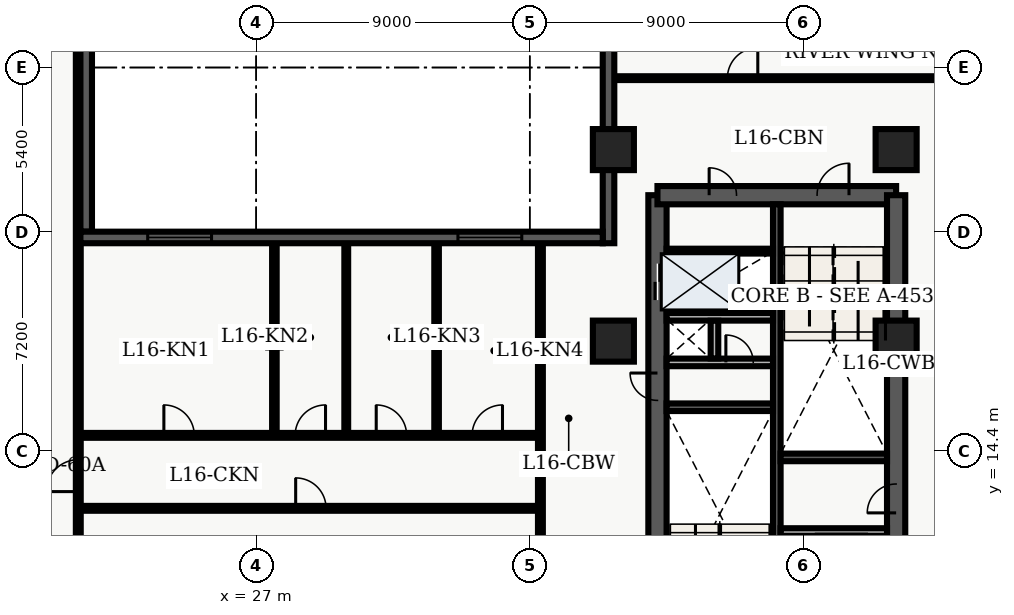
"""IFC4 building model, lengths in metres.
Left out: names, types, materials, properties, quantities, classifications, styles, units other than length and angle.
Written with IfcOpenShell. Run it as: python <this file> out.ifc"""

import sys

from ifc_helpers import new_model, entity, si_unit, converted_unit, direction, frame, origin_with_axes, origin_2d_with_axis, place, context, subcontext, project, spatial, polyline, rectangle, i_section, outline, extrude, element, fill, save


model = new_model("IFC4")
c1 = context("Model", 3, precision=1e-05, world=origin_with_axes(), true_north=direction((0.0, 1.0)))
c2 = subcontext(c1, "Body", "Model", "MODEL_VIEW")
j1 = project(units=[si_unit("LENGTHUNIT", "METRE"), converted_unit("PLANEANGLEUNIT", "DEGREE", entity("IfcPlaneAngleMeasure", 0.017), si_unit("PLANEANGLEUNIT", "RADIAN"), dimensions=[0, 0, 0, 0, 0, 0, 0])], contexts=[c1])
p1 = place(None, origin_with_axes())
s1 = spatial("IfcSite", under=j1, at=p1, CompositionType="ELEMENT")
p2 = place(p1, origin_with_axes())
s2 = spatial("IfcBuilding", under=s1, at=p2, CompositionType="ELEMENT")
p3 = place(p2, frame((0.0, 0.0, 67.8), z_axis=(0.0, 0.0, 1.0), x_axis=(1.0, 0.0, 0.0)))
s3 = spatial("IfcBuildingStorey", under=s2, at=p3, CompositionType="ELEMENT", Elevation=67.8)
p4 = place(p3, frame((40.2, 7.2, 0.0), z_axis=(0.0, 0.0, 1.0), x_axis=(0.0, 1.0, 0.0)))
e1 = element("IfcWall", 1, at=p4, inside=s3, PredefinedType="SHEAR", context=c2, shape_type="SweptSolid", body=[
    extrude(outline(polyline([(0.0, -0.3), (15.6, -0.3), (15.6, 0.3), (0.0, 0.3), (0.0, -0.3)])), origin_with_axes(), (0.0, 0.0, 1.0), 3.66),
])
p5 = place(p4, frame((12.75, 0.0, 0.0), z_axis=(0.0, 0.0, 1.0), x_axis=(1.0, 0.0, 0.0)))
e2 = element("IfcOpeningElement", 2, at=p5, cuts=e1, PredefinedType="OPENING", context=c2, shape_type="SweptSolid", body=[
    extrude(rectangle(XDim=1.2, YDim=0.62, at=origin_2d_with_axis()), origin_with_axes(), (0.0, 0.0, 1.0), 2.15),
])
p6 = place(p4, frame((9.3, 0.0, 0.0), z_axis=(0.0, 0.0, 1.0), x_axis=(1.0, 0.0, 0.0)))
e3 = element("IfcOpeningElement", 3, at=p6, cuts=e1, PredefinedType="OPENING", context=c2, shape_type="SweptSolid", body=[
    extrude(rectangle(XDim=0.9, YDim=0.62, at=origin_2d_with_axis()), origin_with_axes(), (0.0, 0.0, 1.0), 2.15),
])
p7 = place(p3, frame((40.2, 22.8, 0.0), z_axis=(0.0, 0.0, 1.0), x_axis=(1.0, 0.0, 0.0)))
e4 = element("IfcWall", 4, at=p7, inside=s3, PredefinedType="SHEAR", context=c2, shape_type="SweptSolid", body=[
    extrude(outline(polyline([(0.0, -0.3), (7.85, -0.3), (7.85, 0.3), (0.0, 0.3), (0.0, -0.3)])), origin_with_axes(), (0.0, 0.0, 1.0), 3.66),
])
p8 = place(p7, frame((5.775, 0.0, 0.0), z_axis=(0.0, 0.0, 1.0), x_axis=(1.0, 0.0, 0.0)))
e5 = element("IfcOpeningElement", 5, at=p8, cuts=e4, PredefinedType="OPENING", context=c2, shape_type="SweptSolid", body=[
    extrude(rectangle(XDim=1.05, YDim=0.62, at=origin_2d_with_axis()), origin_with_axes(), (0.0, 0.0, 1.0), 2.15),
])
p9 = place(p7, frame((2.15, 0.0, 0.0), z_axis=(0.0, 0.0, 1.0), x_axis=(1.0, 0.0, 0.0)))
e6 = element("IfcOpeningElement", 6, at=p9, cuts=e4, PredefinedType="OPENING", context=c2, shape_type="SweptSolid", body=[
    extrude(rectangle(XDim=0.9, YDim=0.62, at=origin_2d_with_axis()), origin_with_axes(), (0.0, 0.0, 1.0), 2.15),
])
p10 = place(p3, frame((48.05, 7.2, 0.0), z_axis=(0.0, 0.0, 1.0), x_axis=(0.0, 1.0, 0.0)))
e7 = element("IfcWall", 7, at=p10, inside=s3, PredefinedType="SHEAR", context=c2, shape_type="SweptSolid", body=[
    extrude(outline(polyline([(0.0, -0.3), (15.6, -0.3), (15.6, 0.3), (0.0, 0.3), (0.0, -0.3)])), origin_with_axes(), (0.0, 0.0, 1.0), 3.66),
])
p11 = place(p10, frame((1.425, 0.0, 0.0), z_axis=(0.0, 0.0, 1.0), x_axis=(1.0, 0.0, 0.0)))
e8 = element("IfcOpeningElement", 8, at=p11, cuts=e7, PredefinedType="OPENING", context=c2, shape_type="SweptSolid", body=[
    extrude(rectangle(XDim=1.05, YDim=0.62, at=origin_2d_with_axis()), origin_with_axes(), (0.0, 0.0, 1.0), 2.15),
])
p12 = place(p10, frame((3.475, 0.0, 0.0), z_axis=(0.0, 0.0, 1.0), x_axis=(1.0, 0.0, 0.0)))
e9 = element("IfcOpeningElement", 9, at=p12, cuts=e7, PredefinedType="OPENING", context=c2, shape_type="SweptSolid", body=[
    extrude(rectangle(XDim=1.05, YDim=0.62, at=origin_2d_with_axis()), origin_with_axes(), (0.0, 0.0, 1.0), 2.15),
])
p13 = place(p10, frame((5.625, 0.0, 0.0), z_axis=(0.0, 0.0, 1.0), x_axis=(1.0, 0.0, 0.0)))
e10 = element("IfcOpeningElement", 10, at=p13, cuts=e7, PredefinedType="OPENING", context=c2, shape_type="SweptSolid", body=[
    extrude(rectangle(XDim=0.95, YDim=0.62, at=origin_2d_with_axis()), origin_with_axes(), (0.0, 0.0, 1.0), 2.15),
])
p14 = place(p3, frame((44.125, 7.5, 0.0), z_axis=(0.0, 0.0, 1.0), x_axis=(0.0, 1.0, 0.0)))
e11 = element("IfcWall", 11, at=p14, inside=s3, PredefinedType="SHEAR", context=c2, shape_type="SweptSolid", body=[
    extrude(outline(polyline([(0.0, -0.125), (15.0, -0.125), (15.0, 0.125), (0.0, 0.125), (0.0, -0.125)])), origin_with_axes(), (0.0, 0.0, 1.0), 3.66),
])
for number, where, z_axis, x_axis in (
    (12, (40.5, 15.825, 0.0), (0.0, 0.0, 1.0), (1.0, 0.0, 0.0)),
    (13, (44.25, 14.175, 0.0), (0.0, 0.0, 1.0), (1.0, 0.0, 0.0)),
):
    element("IfcWall", number, at=place(p3, frame(where, z_axis=z_axis, x_axis=x_axis)), inside=s3, PredefinedType="SHEAR", context=c2, shape_type="SweptSolid", body=[
        extrude(outline(polyline([(0.0, -0.125), (3.5, -0.125), (3.5, 0.125), (0.0, 0.125), (0.0, -0.125)])), origin_with_axes(), (0.0, 0.0, 1.0), 3.66),
    ])
p15 = place(p3, frame((40.5, 17.3, 0.0), z_axis=(0.0, 0.0, 1.0), x_axis=(1.0, 0.0, 0.0)))
e14 = element("IfcWall", 14, at=p15, inside=s3, PredefinedType="SOLIDWALL", context=c2, shape_type="SweptSolid", body=[
    extrude(outline(polyline([(0.0, -0.125), (3.5, -0.125), (3.5, 0.125), (0.0, 0.125), (0.0, -0.125)])), origin_with_axes(), (0.0, 0.0, 1.0), 2.7),
])
p16 = place(p15, frame((2.4, 0.0, 0.0), z_axis=(0.0, 0.0, 1.0), x_axis=(1.0, 0.0, 0.0)))
e15 = element("IfcOpeningElement", 15, at=p16, cuts=e14, PredefinedType="OPENING", context=c2, shape_type="SweptSolid", body=[
    extrude(rectangle(XDim=0.9, YDim=0.27, at=origin_2d_with_axis()), origin_with_axes(), (0.0, 0.0, 1.0), 2.15),
])
p17 = place(p3, frame((40.5, 18.8, 0.0), z_axis=(0.0, 0.0, 1.0), x_axis=(1.0, 0.0, 0.0)))
e16 = element("IfcWall", 16, at=p17, inside=s3, PredefinedType="SOLIDWALL", context=c2, shape_type="SweptSolid", body=[
    extrude(outline(polyline([(0.0, -0.125), (3.5, -0.125), (3.5, 0.125), (0.0, 0.125), (0.0, -0.125)])), origin_with_axes(), (0.0, 0.0, 1.0), 2.7),
])
p18 = place(p3, frame((42.075, 17.43, 0.0), z_axis=(0.0, 0.0, 1.0), x_axis=(0.0, 1.0, 0.0)))
e17 = element("IfcWall", 17, at=p18, inside=s3, PredefinedType="SOLIDWALL", context=c2, shape_type="SweptSolid", body=[
    extrude(outline(polyline([(0.0, -0.125), (1.24, -0.125), (1.24, 0.125), (0.0, 0.125), (0.0, -0.125)])), origin_with_axes(), (0.0, 0.0, 1.0), 2.7),
])
p19 = place(p3, frame((27.6, 18.0, 0.0), z_axis=(0.0, 0.0, 1.0), x_axis=(1.0, 0.0, 0.0)))
e18 = element("IfcColumn", 18, at=p19, inside=s3, PredefinedType="COLUMN", context=c2, shape_type="SweptSolid", body=[
    extrude(i_section(OverallWidth=0.406, OverallDepth=0.416, WebThickness=0.03, FlangeThickness=0.048, FilletRadius=0.022, at=origin_2d_with_axis()), origin_with_axes(), (0.0, 0.0, 1.0), 3.9),
])
for number, where, z_axis, x_axis in (
    (19, (38.75, 18.0, 0.0), (0.0, 0.0, 1.0), (1.0, 0.0, 0.0)),
    (20, (38.75, 24.3, 0.0), (0.0, 0.0, 1.0), (1.0, 0.0, 0.0)),
    (21, (48.05, 18.0, 0.0), (0.0, 0.0, 1.0), (1.0, 0.0, 0.0)),
    (22, (48.05, 24.3, 0.0), (0.0, 0.0, 1.0), (1.0, 0.0, 0.0)),
):
    element("IfcColumn", number, at=place(p3, frame(where, z_axis=z_axis, x_axis=x_axis)), inside=s3, PredefinedType="COLUMN", context=c2, shape_type="SweptSolid", body=[
        extrude(rectangle(XDim=1.35, YDim=1.35, at=origin_2d_with_axis()), origin_with_axes(), (0.0, 0.0, 1.0), 3.9),
    ])
p20 = place(p3, frame((40.5, 20.96, 0.0), z_axis=(0.0, 0.0, 1.0), x_axis=(1.0, 0.0, 0.0)))
e23 = element("IfcWall", 23, at=p20, inside=s3, PredefinedType="PARTITIONING", context=c2, shape_type="SweptSolid", body=[
    extrude(outline(polyline([(0.0, -0.08), (3.5, -0.08), (3.5, 0.08), (0.0, 0.08), (0.0, -0.08)])), origin_with_axes(), (0.0, 0.0, 1.0), 2.7),
])
p21 = place(p3, frame((44.25, 11.72, 0.0), z_axis=(0.0, 0.0, 1.0), x_axis=(1.0, 0.0, 0.0)))
e24 = element("IfcWall", 24, at=p21, inside=s3, PredefinedType="SOLIDWALL", context=c2, shape_type="SweptSolid", body=[
    extrude(outline(polyline([(0.0, -0.125), (3.5, -0.125), (3.5, 0.125), (0.0, 0.125), (0.0, -0.125)])), origin_with_axes(), (0.0, 0.0, 1.0), 2.7),
])
p22 = place(p3, frame((21.15, 7.8, 0.0), z_axis=(0.0, 0.0, 1.0), x_axis=(0.0, 1.0, 0.0)))
e25 = element("IfcWall", 25, at=p22, inside=s3, PredefinedType="PARTITIONING", context=c2, shape_type="SweptSolid", body=[
    extrude(outline(polyline([(0.0, -0.08), (32.7, -0.08), (32.7, 0.08), (0.0, 0.08), (0.0, -0.08)])), origin_with_axes(), (0.0, 0.0, 1.0), 2.7),
])
p23 = place(p22, frame((5.775, 0.0, 0.0), z_axis=(0.0, 0.0, 1.0), x_axis=(1.0, 0.0, 0.0)))
e26 = element("IfcOpeningElement", 26, at=p23, cuts=e25, PredefinedType="OPENING", context=c2, shape_type="SweptSolid", body=[
    extrude(rectangle(XDim=1.05, YDim=0.18, at=origin_2d_with_axis()), origin_with_axes(), (0.0, 0.0, 1.0), 2.15),
])
p24 = place(p3, frame((21.15, 12.5, 0.0), z_axis=(0.0, 0.0, 1.0), x_axis=(1.0, 0.0, 0.0)))
e27 = element("IfcWall", 27, at=p24, inside=s3, PredefinedType="PARTITIONING", context=c2, shape_type="SweptSolid", body=[
    extrude(outline(polyline([(0.0, -0.08), (15.2, -0.08), (15.2, 0.08), (0.0, 0.08), (0.0, -0.08)])), origin_with_axes(), (0.0, 0.0, 1.0), 2.7),
])
p25 = place(p24, frame((7.65, 0.0, 0.0), z_axis=(0.0, 0.0, 1.0), x_axis=(1.0, 0.0, 0.0)))
e28 = element("IfcOpeningElement", 28, at=p25, cuts=e27, PredefinedType="OPENING", context=c2, shape_type="SweptSolid", body=[
    extrude(rectangle(XDim=1.0, YDim=0.18, at=origin_2d_with_axis()), origin_with_axes(), (0.0, 0.0, 1.0), 2.15),
])
p26 = place(p3, frame((21.15, 14.9, 0.0), z_axis=(0.0, 0.0, 1.0), x_axis=(1.0, 0.0, 0.0)))
e29 = element("IfcWall", 29, at=p26, inside=s3, PredefinedType="PARTITIONING", context=c2, shape_type="SweptSolid", body=[
    extrude(outline(polyline([(0.0, -0.08), (15.2, -0.08), (15.2, 0.08), (0.0, 0.08), (0.0, -0.08)])), origin_with_axes(), (0.0, 0.0, 1.0), 2.7),
])
p27 = place(p26, frame((3.315, 0.0, 0.0), z_axis=(0.0, 0.0, 1.0), x_axis=(1.0, 0.0, 0.0)))
e30 = element("IfcOpeningElement", 30, at=p27, cuts=e29, PredefinedType="OPENING", context=c2, shape_type="SweptSolid", body=[
    extrude(rectangle(XDim=1.0, YDim=0.18, at=origin_2d_with_axis()), origin_with_axes(), (0.0, 0.0, 1.0), 2.15),
])
p28 = place(p26, frame((7.632, 0.0, 0.0), z_axis=(0.0, 0.0, 1.0), x_axis=(1.0, 0.0, 0.0)))
e31 = element("IfcOpeningElement", 31, at=p28, cuts=e29, PredefinedType="OPENING", context=c2, shape_type="SweptSolid", body=[
    extrude(rectangle(XDim=1.0, YDim=0.18, at=origin_2d_with_axis()), origin_with_axes(), (0.0, 0.0, 1.0), 2.15),
])
p29 = place(p26, frame((10.3, 0.0, 0.0), z_axis=(0.0, 0.0, 1.0), x_axis=(1.0, 0.0, 0.0)))
e32 = element("IfcOpeningElement", 32, at=p29, cuts=e29, PredefinedType="OPENING", context=c2, shape_type="SweptSolid", body=[
    extrude(rectangle(XDim=1.0, YDim=0.18, at=origin_2d_with_axis()), origin_with_axes(), (0.0, 0.0, 1.0), 2.15),
])
p30 = place(p26, frame((13.453, 0.0, 0.0), z_axis=(0.0, 0.0, 1.0), x_axis=(1.0, 0.0, 0.0)))
e33 = element("IfcOpeningElement", 33, at=p30, cuts=e29, PredefinedType="OPENING", context=c2, shape_type="SweptSolid", body=[
    extrude(rectangle(XDim=1.0, YDim=0.18, at=origin_2d_with_axis()), origin_with_axes(), (0.0, 0.0, 1.0), 2.15),
])
p31 = place(p3, frame((36.35, 4.35, 0.0), z_axis=(0.0, 0.0, 1.0), x_axis=(0.0, 1.0, 0.0)))
e34 = element("IfcWall", 34, at=p31, inside=s3, PredefinedType="PARTITIONING", context=c2, shape_type="SweptSolid", body=[
    extrude(outline(polyline([(0.0, -0.08), (16.95, -0.08), (16.95, 0.08), (0.0, 0.08), (0.0, -0.08)])), origin_with_axes(), (0.0, 0.0, 1.0), 2.7),
])
p32 = place(p3, frame((27.6, 15.02, 0.0), z_axis=(0.0, 0.0, 1.0), x_axis=(0.0, 1.0, 0.0)))
e35 = element("IfcWall", 35, at=p32, inside=s3, PredefinedType="PARTITIONING", context=c2, shape_type="SweptSolid", body=[
    extrude(outline(polyline([(0.0, -0.075), (6.205, -0.075), (6.205, 0.075), (0.0, 0.075), (0.0, -0.075)])), origin_with_axes(), (0.0, 0.0, 1.0), 2.7),
])
p33 = place(p3, frame((29.964, 15.02, 0.0), z_axis=(0.0, 0.0, 1.0), x_axis=(0.0, 1.0, 0.0)))
e36 = element("IfcWall", 36, at=p33, inside=s3, PredefinedType="PARTITIONING", context=c2, shape_type="SweptSolid", body=[
    extrude(outline(polyline([(0.0, -0.062), (6.205, -0.062), (6.205, 0.062), (0.0, 0.062), (0.0, -0.062)])), origin_with_axes(), (0.0, 0.0, 1.0), 2.7),
])
p34 = place(p3, frame((32.935, 15.02, 0.0), z_axis=(0.0, 0.0, 1.0), x_axis=(0.0, 1.0, 0.0)))
e37 = element("IfcWall", 37, at=p34, inside=s3, PredefinedType="PARTITIONING", context=c2, shape_type="SweptSolid", body=[
    extrude(outline(polyline([(0.0, -0.075), (6.205, -0.075), (6.205, 0.075), (0.0, 0.075), (0.0, -0.075)])), origin_with_axes(), (0.0, 0.0, 1.0), 2.7),
])
p35 = place(p3, frame((38.76, 26.65, 0.0), z_axis=(0.0, 0.0, 1.0), x_axis=(1.0, 0.0, 0.0)))
e38 = element("IfcWall", 38, at=p35, inside=s3, PredefinedType="PARTITIONING", context=c2, shape_type="SweptSolid", body=[
    extrude(outline(polyline([(0.0, -0.062), (20.88, -0.062), (20.88, 0.062), (0.0, 0.062), (0.0, -0.062)])), origin_with_axes(), (0.0, 0.0, 1.0), 2.7),
])
p36 = place(p35, frame((4.24, 0.0, 0.0), z_axis=(0.0, 0.0, 1.0), x_axis=(1.0, 0.0, 0.0)))
e39 = element("IfcOpeningElement", 39, at=p36, cuts=e38, PredefinedType="OPENING", context=c2, shape_type="SweptSolid", body=[
    extrude(rectangle(XDim=1.0, YDim=0.145, at=origin_2d_with_axis()), origin_with_axes(), (0.0, 0.0, 1.0), 2.15),
])
p37 = place(p3, frame((38.59, 21.22, 0.0), z_axis=(0.0, 0.0, 1.0), x_axis=(0.0, 1.0, 0.0)))
e40 = element("IfcWall", 40, at=p37, inside=s3, PredefinedType="SOLIDWALL", context=c2, shape_type="SweptSolid", body=[
    extrude(outline(polyline([(0.0, -0.19), (7.58, -0.19), (7.58, 0.19), (0.0, 0.19), (0.0, -0.19)])), origin_with_axes(), (0.0, 0.0, 1.0), 3.66),
])
p38 = place(p3, frame((21.41, 45.82, 0.0), z_axis=(0.0, 0.0, 1.0), x_axis=(0.0, -1.0, 0.0)))
e41 = element("IfcWall", 41, at=p38, inside=s3, PredefinedType="SOLIDWALL", context=c2, shape_type="SweptSolid", body=[
    extrude(outline(polyline([(0.0, -0.19), (24.22, -0.19), (24.22, 0.19), (0.0, 0.19), (0.0, -0.19)])), origin_with_axes(), (0.0, 0.0, 1.0), 3.66),
])
p39 = place(p38, frame((2.902, 0.0, 0.45), z_axis=(0.0, 0.0, 1.0), x_axis=(1.0, 0.0, 0.0)))
e42 = element("IfcOpeningElement", 42, at=p39, cuts=e41, PredefinedType="OPENING", context=c2, shape_type="SweptSolid", body=[
    extrude(rectangle(XDim=2.1, YDim=0.4, at=origin_2d_with_axis()), origin_with_axes(), (0.0, 0.0, 1.0), 2.2),
])
p40 = place(p3, frame((21.22, 21.41, 0.0), z_axis=(0.0, 0.0, 1.0), x_axis=(1.0, 0.0, 0.0)))
e43 = element("IfcWall", 43, at=p40, inside=s3, PredefinedType="SOLIDWALL", context=c2, shape_type="SweptSolid", body=[
    extrude(outline(polyline([(0.0, -0.19), (17.18, -0.19), (17.18, 0.19), (0.0, 0.19), (0.0, -0.19)])), origin_with_axes(), (0.0, 0.0, 1.0), 3.66),
])
p41 = place(p40, frame((3.263, 0.0, 0.45), z_axis=(0.0, 0.0, 1.0), x_axis=(1.0, 0.0, 0.0)))
e44 = element("IfcOpeningElement", 44, at=p41, cuts=e43, PredefinedType="OPENING", context=c2, shape_type="SweptSolid", body=[
    extrude(rectangle(XDim=2.1, YDim=0.4, at=origin_2d_with_axis()), origin_with_axes(), (0.0, 0.0, 1.0), 2.2),
])
p42 = place(p40, frame((13.467, 0.0, 0.45), z_axis=(0.0, 0.0, 1.0), x_axis=(1.0, 0.0, 0.0)))
e45 = element("IfcOpeningElement", 45, at=p42, cuts=e43, PredefinedType="OPENING", context=c2, shape_type="SweptSolid", body=[
    extrude(rectangle(XDim=2.1, YDim=0.4, at=origin_2d_with_axis()), origin_with_axes(), (0.0, 0.0, 1.0), 2.2),
])
p43 = place(p4, frame((12.75, 0.0, 0.0), z_axis=(0.0, 0.0, 1.0), x_axis=(1.0, 0.0, 0.0)))
e46 = element("IfcDoor", 46, at=p43, inside=s3, OperationType="DOUBLE_DOOR_SLIDING", PredefinedType="DOOR", context=c2, shape_type="SweptSolid", body=[
    extrude(rectangle(XDim=1.2, YDim=0.09, at=origin_2d_with_axis()), origin_with_axes(), (0.0, 0.0, 1.0), 2.15),
])
fill(e2, e46)
p44 = place(p4, frame((9.3, 0.0, 0.0), z_axis=(0.0, 0.0, 1.0), x_axis=(1.0, 0.0, 0.0)))
e47 = element("IfcDoor", 47, at=p44, inside=s3, OperationType="SINGLE_SWING_RIGHT", PredefinedType="DOOR", context=c2, shape_type="SweptSolid", body=[
    extrude(rectangle(XDim=0.9, YDim=0.09, at=origin_2d_with_axis()), origin_with_axes(), (0.0, 0.0, 1.0), 2.15),
])
fill(e3, e47)
p45 = place(p15, frame((2.4, 0.0, 0.0), z_axis=(0.0, 0.0, 1.0), x_axis=(1.0, 0.0, 0.0)))
e48 = element("IfcDoor", 48, at=p45, inside=s3, OperationType="SINGLE_SWING_LEFT", PredefinedType="DOOR", context=c2, shape_type="SweptSolid", body=[
    extrude(rectangle(XDim=0.9, YDim=0.09, at=origin_2d_with_axis()), origin_with_axes(), (0.0, 0.0, 1.0), 2.15),
])
fill(e15, e48)
p46 = place(p7, frame((5.775, 0.0, 0.0), z_axis=(0.0, 0.0, 1.0), x_axis=(1.0, 0.0, 0.0)))
e49 = element("IfcDoor", 49, at=p46, inside=s3, OperationType="SINGLE_SWING_RIGHT", PredefinedType="DOOR", context=c2, shape_type="SweptSolid", body=[
    extrude(rectangle(XDim=1.05, YDim=0.09, at=origin_2d_with_axis()), origin_with_axes(), (0.0, 0.0, 1.0), 2.15),
])
fill(e5, e49)
p47 = place(p7, frame((2.15, 0.0, 0.0), z_axis=(0.0, 0.0, 1.0), x_axis=(1.0, 0.0, 0.0)))
e50 = element("IfcDoor", 50, at=p47, inside=s3, OperationType="SINGLE_SWING_LEFT", PredefinedType="DOOR", context=c2, shape_type="SweptSolid", body=[
    extrude(rectangle(XDim=0.9, YDim=0.09, at=origin_2d_with_axis()), origin_with_axes(), (0.0, 0.0, 1.0), 2.15),
])
fill(e6, e50)
p48 = place(p10, frame((5.625, 0.0, 0.0), z_axis=(0.0, 0.0, 1.0), x_axis=(1.0, 0.0, 0.0)))
e51 = element("IfcDoor", 51, at=p48, inside=s3, OperationType="SINGLE_SWING_LEFT", PredefinedType="DOOR", context=c2, shape_type="SweptSolid", body=[
    extrude(rectangle(XDim=0.95, YDim=0.09, at=origin_2d_with_axis()), origin_with_axes(), (0.0, 0.0, 1.0), 2.15),
])
fill(e10, e51)
p49 = place(p22, frame((5.775, 0.0, 0.0), z_axis=(0.0, 0.0, 1.0), x_axis=(1.0, 0.0, 0.0)))
e52 = element("IfcDoor", 52, at=p49, inside=s3, OperationType="SINGLE_SWING_LEFT", PredefinedType="DOOR", context=c2, shape_type="SweptSolid", body=[
    extrude(rectangle(XDim=1.05, YDim=0.09, at=origin_2d_with_axis()), origin_with_axes(), (0.0, 0.0, 1.0), 2.15),
])
fill(e26, e52)
p50 = place(p24, frame((7.65, 0.0, 0.0), z_axis=(0.0, 0.0, 1.0), x_axis=(1.0, 0.0, 0.0)))
e53 = element("IfcDoor", 53, at=p50, inside=s3, OperationType="SINGLE_SWING_LEFT", PredefinedType="DOOR", context=c2, shape_type="SweptSolid", body=[
    extrude(rectangle(XDim=1.0, YDim=0.09, at=origin_2d_with_axis()), origin_with_axes(), (0.0, 0.0, 1.0), 2.15),
])
fill(e28, e53)
p51 = place(p26, frame((3.315, 0.0, 0.0), z_axis=(0.0, 0.0, 1.0), x_axis=(1.0, 0.0, 0.0)))
e54 = element("IfcDoor", 54, at=p51, inside=s3, OperationType="SINGLE_SWING_LEFT", PredefinedType="DOOR", context=c2, shape_type="SweptSolid", body=[
    extrude(rectangle(XDim=1.0, YDim=0.09, at=origin_2d_with_axis()), origin_with_axes(), (0.0, 0.0, 1.0), 2.15),
])
fill(e30, e54)
p52 = place(p26, frame((7.632, 0.0, 0.0), z_axis=(0.0, 0.0, 1.0), x_axis=(1.0, 0.0, 0.0)))
e55 = element("IfcDoor", 55, at=p52, inside=s3, OperationType="SINGLE_SWING_RIGHT", PredefinedType="DOOR", context=c2, shape_type="SweptSolid", body=[
    extrude(rectangle(XDim=1.0, YDim=0.09, at=origin_2d_with_axis()), origin_with_axes(), (0.0, 0.0, 1.0), 2.15),
])
fill(e31, e55)
p53 = place(p26, frame((10.3, 0.0, 0.0), z_axis=(0.0, 0.0, 1.0), x_axis=(1.0, 0.0, 0.0)))
e56 = element("IfcDoor", 56, at=p53, inside=s3, OperationType="SINGLE_SWING_LEFT", PredefinedType="DOOR", context=c2, shape_type="SweptSolid", body=[
    extrude(rectangle(XDim=1.0, YDim=0.09, at=origin_2d_with_axis()), origin_with_axes(), (0.0, 0.0, 1.0), 2.15),
])
fill(e32, e56)
p54 = place(p26, frame((13.453, 0.0, 0.0), z_axis=(0.0, 0.0, 1.0), x_axis=(1.0, 0.0, 0.0)))
e57 = element("IfcDoor", 57, at=p54, inside=s3, OperationType="SINGLE_SWING_RIGHT", PredefinedType="DOOR", context=c2, shape_type="SweptSolid", body=[
    extrude(rectangle(XDim=1.0, YDim=0.09, at=origin_2d_with_axis()), origin_with_axes(), (0.0, 0.0, 1.0), 2.15),
])
fill(e33, e57)
p55 = place(p35, frame((4.24, 0.0, 0.0), z_axis=(0.0, 0.0, 1.0), x_axis=(1.0, 0.0, 0.0)))
e58 = element("IfcDoor", 58, at=p55, inside=s3, OperationType="SINGLE_SWING_RIGHT", PredefinedType="DOOR", context=c2, shape_type="SweptSolid", body=[
    extrude(rectangle(XDim=1.0, YDim=0.075, at=origin_2d_with_axis()), origin_with_axes(), (0.0, 0.0, 1.0), 2.15),
])
fill(e39, e58)
p56 = place(p40, frame((3.263, 0.0, 0.45), z_axis=(0.0, 0.0, 1.0), x_axis=(1.0, 0.0, 0.0)))
e59 = element("IfcWindow", 59, at=p56, inside=s3, PredefinedType="WINDOW", context=c2, shape_type="SweptSolid", body=[
    extrude(rectangle(XDim=2.1, YDim=0.09, at=origin_2d_with_axis()), origin_with_axes(), (0.0, 0.0, 1.0), 2.2),
])
fill(e44, e59)
p57 = place(p40, frame((13.467, 0.0, 0.45), z_axis=(0.0, 0.0, 1.0), x_axis=(1.0, 0.0, 0.0)))
e60 = element("IfcWindow", 60, at=p57, inside=s3, PredefinedType="WINDOW", context=c2, shape_type="SweptSolid", body=[
    extrude(rectangle(XDim=2.1, YDim=0.09, at=origin_2d_with_axis()), origin_with_axes(), (0.0, 0.0, 1.0), 2.2),
])
fill(e45, e60)
save(model, sys.argv[1])
